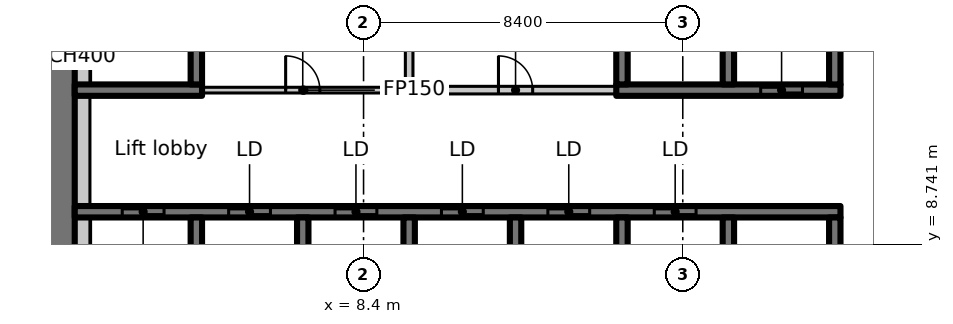
"""IFC4 building model, lengths in metres.
Left out: names, types, materials, properties, quantities, classifications, styles, units other than length and angle.
Written with IfcOpenShell. Run it as: python <this file> out.ifc"""

import sys

from ifc_helpers import new_model, si_unit, direction, frame, frame_2d, origin, place, context, subcontext, project, spatial, rectangle, extrude, element, fill, save


model = new_model("IFC4")
c1 = context("Model", 3, precision=1e-05, world=origin(), true_north=direction((0.0, 1.0)))
c2 = subcontext(c1, "Body", "Model", "MODEL_VIEW")
j1 = project(units=[si_unit("LENGTHUNIT", "METRE"), si_unit("PLANEANGLEUNIT", "RADIAN")], contexts=[c1])
p1 = place(None, origin())
s1 = spatial("IfcSite", under=j1, at=p1, CompositionType="ELEMENT")
p2 = place(p1, origin())
s2 = spatial("IfcBuilding", under=s1, at=p2, CompositionType="ELEMENT")
p3 = place(p2, frame((0.0, 0.0, 145.7)))
s3 = spatial("IfcBuildingStorey", under=s2, at=p3, CompositionType="ELEMENT", Elevation=145.7)
p4 = place(p3, frame((0.4, 7.136, 0.0), z_axis=(0.0, 0.0, 1.0), x_axis=(0.0, 1.0, 0.0)))
e1 = element("IfcWall", 1, at=p4, inside=s3, PredefinedType="SHEAR", context=c2, shape_type="SweptSolid", body=[
    extrude(rectangle(XDim=8.864, YDim=0.8, at=frame_2d((4.432, 0.0))), origin(), (0.0, 0.0, 1.0), 3.35),
])
p5 = place(p3, frame((0.8, 9.6, 0.0), z_axis=(0.0, 0.0, 1.0), x_axis=(1.0, 0.0, 0.0)))
e2 = element("IfcWall", 2, at=p5, inside=s3, PredefinedType="SHEAR", context=c2, shape_type="SweptSolid", body=[
    extrude(rectangle(XDim=20.15, YDim=0.3, at=frame_2d((10.075, 0.0))), origin(), (0.0, 0.0, 1.0), 3.35),
])
p6 = place(p5, frame((1.25, 0.0, 0.0)))
e3 = element("IfcOpeningElement", 3, at=p6, cuts=e2, PredefinedType="OPENING", context=c2, shape_type="SweptSolid", body=[
    extrude(rectangle(XDim=1.1, YDim=2.3, at=frame_2d((0.55, 1.15))), frame((0.0, 0.16, 0.0), z_axis=(0.0, -1.0, 0.0), x_axis=(1.0, 0.0, 0.0)), (0.0, 0.0, 1.0), 0.32),
])
p7 = place(p5, frame((4.05, 0.0, 0.0)))
e4 = element("IfcOpeningElement", 4, at=p7, cuts=e2, PredefinedType="OPENING", context=c2, shape_type="SweptSolid", body=[
    extrude(rectangle(XDim=1.1, YDim=2.3, at=frame_2d((0.55, 1.15))), frame((0.0, 0.16, 0.0), z_axis=(0.0, -1.0, 0.0), x_axis=(1.0, 0.0, 0.0)), (0.0, 0.0, 1.0), 0.32),
])
p8 = place(p5, frame((6.85, 0.0, 0.0)))
e5 = element("IfcOpeningElement", 5, at=p8, cuts=e2, PredefinedType="OPENING", context=c2, shape_type="SweptSolid", body=[
    extrude(rectangle(XDim=1.1, YDim=2.3, at=frame_2d((0.55, 1.15))), frame((0.0, 0.16, 0.0), z_axis=(0.0, -1.0, 0.0), x_axis=(1.0, 0.0, 0.0)), (0.0, 0.0, 1.0), 0.32),
])
p9 = place(p5, frame((9.65, 0.0, 0.0)))
e6 = element("IfcOpeningElement", 6, at=p9, cuts=e2, PredefinedType="OPENING", context=c2, shape_type="SweptSolid", body=[
    extrude(rectangle(XDim=1.1, YDim=2.3, at=frame_2d((0.55, 1.15))), frame((0.0, 0.16, 0.0), z_axis=(0.0, -1.0, 0.0), x_axis=(1.0, 0.0, 0.0)), (0.0, 0.0, 1.0), 0.32),
])
p10 = place(p5, frame((12.45, 0.0, 0.0)))
e7 = element("IfcOpeningElement", 7, at=p10, cuts=e2, PredefinedType="OPENING", context=c2, shape_type="SweptSolid", body=[
    extrude(rectangle(XDim=1.1, YDim=2.3, at=frame_2d((0.55, 1.15))), frame((0.0, 0.16, 0.0), z_axis=(0.0, -1.0, 0.0), x_axis=(1.0, 0.0, 0.0)), (0.0, 0.0, 1.0), 0.32),
])
p11 = place(p5, frame((15.25, 0.0, 0.0)))
e8 = element("IfcOpeningElement", 8, at=p11, cuts=e2, PredefinedType="OPENING", context=c2, shape_type="SweptSolid", body=[
    extrude(rectangle(XDim=1.1, YDim=2.3, at=frame_2d((0.55, 1.15))), frame((0.0, 0.16, 0.0), z_axis=(0.0, -1.0, 0.0), x_axis=(1.0, 0.0, 0.0)), (0.0, 0.0, 1.0), 0.32),
])
for number, where, z_axis, x_axis in (
    (9, (4.0, 7.15, 0.0), (0.0, 0.0, 1.0), (0.0, 1.0, 0.0)),
    (10, (6.8, 7.15, 0.0), (0.0, 0.0, 1.0), (0.0, 1.0, 0.0)),
    (11, (9.6, 7.15, 0.0), (0.0, 0.0, 1.0), (0.0, 1.0, 0.0)),
    (12, (12.4, 7.15, 0.0), (0.0, 0.0, 1.0), (0.0, 1.0, 0.0)),
    (13, (15.2, 7.15, 0.0), (0.0, 0.0, 1.0), (0.0, 1.0, 0.0)),
    (14, (18.0, 7.15, 0.0), (0.0, 0.0, 1.0), (0.0, 1.0, 0.0)),
    (15, (20.8, 7.15, 0.0), (0.0, 0.0, 1.0), (0.0, 1.0, 0.0)),
):
    element("IfcWall", number, at=place(p3, frame(where, z_axis=z_axis, x_axis=x_axis)), inside=s3, PredefinedType="SHEAR", context=c2, shape_type="SweptSolid", body=[
        extrude(rectangle(XDim=2.3, YDim=0.3, at=frame_2d((1.15, 0.0))), origin(), (0.0, 0.0, 1.0), 3.35),
    ])
p12 = place(p3, frame((0.8, 12.8, 0.0), z_axis=(0.0, 0.0, 1.0), x_axis=(1.0, 0.0, 0.0)))
e16 = element("IfcWall", 16, at=p12, inside=s3, PredefinedType="SHEAR", context=c2, shape_type="SweptSolid", body=[
    extrude(rectangle(XDim=3.35, YDim=0.3, at=frame_2d((1.675, 0.0))), origin(), (0.0, 0.0, 1.0), 3.35),
])
p13 = place(p3, frame((4.0, 12.95, 0.0), z_axis=(0.0, 0.0, 1.0), x_axis=(0.0, 1.0, 0.0)))
e17 = element("IfcWall", 17, at=p13, inside=s3, PredefinedType="SHEAR", context=c2, shape_type="SweptSolid", body=[
    extrude(rectangle(XDim=3.05, YDim=0.3, at=frame_2d((1.525, 0.0))), origin(), (0.0, 0.0, 1.0), 3.35),
])
p14 = place(p3, frame((15.05, 12.8, 0.0), z_axis=(0.0, 0.0, 1.0), x_axis=(1.0, 0.0, 0.0)))
e18 = element("IfcWall", 18, at=p14, inside=s3, PredefinedType="SHEAR", context=c2, shape_type="SweptSolid", body=[
    extrude(rectangle(XDim=5.9, YDim=0.3, at=frame_2d((2.95, 0.0))), origin(), (0.0, 0.0, 1.0), 3.35),
])
p15 = place(p14, frame((3.8, 0.0, 0.0)))
e19 = element("IfcOpeningElement", 19, at=p15, cuts=e18, PredefinedType="OPENING", context=c2, shape_type="SweptSolid", body=[
    extrude(rectangle(XDim=1.1, YDim=2.3, at=frame_2d((0.55, 1.15))), frame((0.0, 0.16, 0.0), z_axis=(0.0, -1.0, 0.0), x_axis=(1.0, 0.0, 0.0)), (0.0, 0.0, 1.0), 0.32),
])
for number, where, z_axis, x_axis in (
    (20, (15.2, 12.95, 0.0), (0.0, 0.0, 1.0), (0.0, 1.0, 0.0)),
    (21, (18.0, 12.95, 0.0), (0.0, 0.0, 1.0), (0.0, 1.0, 0.0)),
    (22, (20.8, 12.95, 0.0), (0.0, 0.0, 1.0), (0.0, 1.0, 0.0)),
):
    element("IfcWall", number, at=place(p3, frame(where, z_axis=z_axis, x_axis=x_axis)), inside=s3, PredefinedType="SHEAR", context=c2, shape_type="SweptSolid", body=[
        extrude(rectangle(XDim=3.05, YDim=0.3, at=frame_2d((1.525, 0.0))), origin(), (0.0, 0.0, 1.0), 3.35),
    ])
p16 = place(p3, frame((9.6, 15.588, 0.0), z_axis=(0.0, 0.0, 1.0), x_axis=(0.0, -1.0, 0.0)))
e23 = element("IfcWall", 23, at=p16, inside=s3, PredefinedType="PARTITIONING", context=c2, shape_type="SweptSolid", body=[
    extrude(rectangle(XDim=2.788, YDim=0.2, at=frame_2d((1.394, 0.0))), origin(), (0.0, 0.0, 1.0), 3.35),
])
p17 = place(p3, frame((9.7, 12.8, 0.0), z_axis=(0.0, 0.0, 1.0), x_axis=(1.0, 0.0, 0.0)))
e24 = element("IfcWall", 24, at=p17, inside=s3, PredefinedType="PARTITIONING", context=c2, shape_type="SweptSolid", body=[
    extrude(rectangle(XDim=5.338, YDim=0.2, at=frame_2d((2.669, 0.0))), origin(), (0.0, 0.0, 1.0), 3.35),
])
p18 = place(p17, frame((2.25, 0.0, 0.0)))
e25 = element("IfcOpeningElement", 25, at=p18, cuts=e24, PredefinedType="OPENING", context=c2, shape_type="SweptSolid", body=[
    extrude(rectangle(XDim=0.9, YDim=2.1, at=frame_2d((0.45, 1.05))), frame((0.0, 0.11, 0.0), z_axis=(0.0, -1.0, 0.0), x_axis=(1.0, 0.0, 0.0)), (0.0, 0.0, 1.0), 0.22),
])
p19 = place(p3, frame((4.162, 12.8, 0.0), z_axis=(0.0, 0.0, 1.0), x_axis=(1.0, 0.0, 0.0)))
e26 = element("IfcWall", 26, at=p19, inside=s3, PredefinedType="PARTITIONING", context=c2, shape_type="SweptSolid", body=[
    extrude(rectangle(XDim=5.338, YDim=0.15, at=frame_2d((2.669, 0.0))), origin(), (0.0, 0.0, 1.0), 3.35),
])
p20 = place(p19, frame((2.188, 0.0, 0.0)))
e27 = element("IfcOpeningElement", 27, at=p20, cuts=e26, PredefinedType="OPENING", context=c2, shape_type="SweptSolid", body=[
    extrude(rectangle(XDim=0.9, YDim=2.1, at=frame_2d((0.45, 1.05))), frame((0.0, 0.085, 0.0), z_axis=(0.0, -1.0, 0.0), x_axis=(1.0, 0.0, 0.0)), (0.0, 0.0, 1.0), 0.17),
])
p21 = place(p3, frame((1.0, 7.15, 0.0), z_axis=(0.0, 0.0, 1.0), x_axis=(0.0, 1.0, 0.0)))
e28 = element("IfcWall", 28, at=p21, inside=s3, PredefinedType="PARTITIONING", context=c2, shape_type="SweptSolid", body=[
    extrude(rectangle(XDim=2.3, YDim=0.4, at=frame_2d((1.15, 0.0))), origin(), (0.0, 0.0, 1.0), 3.35),
])
p22 = place(p3, frame((1.0, 9.75, 0.0), z_axis=(0.0, 0.0, 1.0), x_axis=(0.0, 1.0, 0.0)))
e29 = element("IfcWall", 29, at=p22, inside=s3, PredefinedType="PARTITIONING", context=c2, shape_type="SweptSolid", body=[
    extrude(rectangle(XDim=2.9, YDim=0.4, at=frame_2d((1.45, 0.0))), origin(), (0.0, 0.0, 1.0), 3.35),
])
p23 = place(p3, frame((1.0, 12.95, 0.0), z_axis=(0.0, 0.0, 1.0), x_axis=(0.0, 1.0, 0.0)))
e30 = element("IfcWall", 30, at=p23, inside=s3, PredefinedType="PARTITIONING", context=c2, shape_type="SweptSolid", body=[
    extrude(rectangle(XDim=2.65, YDim=0.4, at=frame_2d((1.325, 0.0))), origin(), (0.0, 0.0, 1.0), 3.35),
])
p24 = place(p6, origin())
e31 = element("IfcDoor", 31, at=p24, inside=s3, OperationType="SLIDING_TO_LEFT", PredefinedType="DOOR", context=c2, shape_type="SweptSolid", body=[
    extrude(rectangle(XDim=1.1, YDim=2.3, at=frame_2d((0.55, 1.15))), frame((0.0, 0.025, 0.0), z_axis=(0.0, -1.0, 0.0), x_axis=(1.0, 0.0, 0.0)), (0.0, 0.0, 1.0), 0.05),
])
fill(e3, e31)
p25 = place(p7, origin())
e32 = element("IfcDoor", 32, at=p25, inside=s3, OperationType="SLIDING_TO_LEFT", PredefinedType="DOOR", context=c2, shape_type="SweptSolid", body=[
    extrude(rectangle(XDim=1.1, YDim=2.3, at=frame_2d((0.55, 1.15))), frame((0.0, 0.025, 0.0), z_axis=(0.0, -1.0, 0.0), x_axis=(1.0, 0.0, 0.0)), (0.0, 0.0, 1.0), 0.05),
])
fill(e4, e32)
p26 = place(p8, origin())
e33 = element("IfcDoor", 33, at=p26, inside=s3, OperationType="SLIDING_TO_LEFT", PredefinedType="DOOR", context=c2, shape_type="SweptSolid", body=[
    extrude(rectangle(XDim=1.1, YDim=2.3, at=frame_2d((0.55, 1.15))), frame((0.0, 0.025, 0.0), z_axis=(0.0, -1.0, 0.0), x_axis=(1.0, 0.0, 0.0)), (0.0, 0.0, 1.0), 0.05),
])
fill(e5, e33)
p27 = place(p9, origin())
e34 = element("IfcDoor", 34, at=p27, inside=s3, OperationType="SLIDING_TO_LEFT", PredefinedType="DOOR", context=c2, shape_type="SweptSolid", body=[
    extrude(rectangle(XDim=1.1, YDim=2.3, at=frame_2d((0.55, 1.15))), frame((0.0, 0.025, 0.0), z_axis=(0.0, -1.0, 0.0), x_axis=(1.0, 0.0, 0.0)), (0.0, 0.0, 1.0), 0.05),
])
fill(e6, e34)
p28 = place(p10, origin())
e35 = element("IfcDoor", 35, at=p28, inside=s3, OperationType="SLIDING_TO_LEFT", PredefinedType="DOOR", context=c2, shape_type="SweptSolid", body=[
    extrude(rectangle(XDim=1.1, YDim=2.3, at=frame_2d((0.55, 1.15))), frame((0.0, 0.025, 0.0), z_axis=(0.0, -1.0, 0.0), x_axis=(1.0, 0.0, 0.0)), (0.0, 0.0, 1.0), 0.05),
])
fill(e7, e35)
p29 = place(p11, origin())
e36 = element("IfcDoor", 36, at=p29, inside=s3, OperationType="SLIDING_TO_LEFT", PredefinedType="DOOR", context=c2, shape_type="SweptSolid", body=[
    extrude(rectangle(XDim=1.1, YDim=2.3, at=frame_2d((0.55, 1.15))), frame((0.0, 0.025, 0.0), z_axis=(0.0, -1.0, 0.0), x_axis=(1.0, 0.0, 0.0)), (0.0, 0.0, 1.0), 0.05),
])
fill(e8, e36)
p30 = place(p15, origin())
e37 = element("IfcDoor", 37, at=p30, inside=s3, OperationType="SLIDING_TO_LEFT", PredefinedType="DOOR", context=c2, shape_type="SweptSolid", body=[
    extrude(rectangle(XDim=1.1, YDim=2.3, at=frame_2d((0.55, 1.15))), frame((0.0, 0.025, 0.0), z_axis=(0.0, -1.0, 0.0), x_axis=(1.0, 0.0, 0.0)), (0.0, 0.0, 1.0), 0.05),
])
fill(e19, e37)
p31 = place(p20, origin())
e38 = element("IfcDoor", 38, at=p31, inside=s3, OperationType="SINGLE_SWING_LEFT", PredefinedType="DOOR", context=c2, shape_type="SweptSolid", body=[
    extrude(rectangle(XDim=0.9, YDim=2.1, at=frame_2d((0.45, 1.05))), frame((0.0, 0.025, 0.0), z_axis=(0.0, -1.0, 0.0), x_axis=(1.0, 0.0, 0.0)), (0.0, 0.0, 1.0), 0.05),
])
fill(e27, e38)
p32 = place(p18, origin())
e39 = element("IfcDoor", 39, at=p32, inside=s3, OperationType="SINGLE_SWING_RIGHT", PredefinedType="DOOR", context=c2, shape_type="SweptSolid", body=[
    extrude(rectangle(XDim=0.9, YDim=2.1, at=frame_2d((0.45, 1.05))), frame((0.0, 0.025, 0.0), z_axis=(0.0, -1.0, 0.0), x_axis=(1.0, 0.0, 0.0)), (0.0, 0.0, 1.0), 0.05),
])
fill(e25, e39)
save(model, sys.argv[1])
